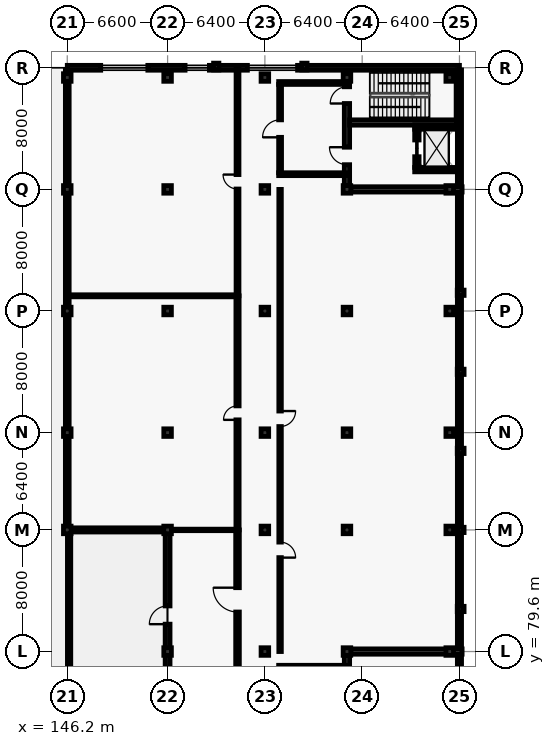
"""IFC4 building model, lengths in metres.
Left out: names, types, materials, properties, quantities, classifications, styles, units other than length and angle.
Written with IfcOpenShell. Run it as: python <this file> out.ifc"""

import sys

from ifc_helpers import new_model, si_unit, direction, frame, frame_2d, origin, origin_2d, place, context, subcontext, project, spatial, rectangle, extrude, element, fill, save


model = new_model("IFC4")
c1 = context("Model", 3, precision=1e-05, world=origin(), true_north=direction((0.0, 1.0)))
c2 = subcontext(c1, "Body", "Model", "MODEL_VIEW")
j1 = project(units=[si_unit("LENGTHUNIT", "METRE"), si_unit("PLANEANGLEUNIT", "RADIAN")], contexts=[c1])
p1 = place(None, origin())
s1 = spatial("IfcSite", under=j1, at=p1, CompositionType="ELEMENT")
p2 = place(p1, origin())
s2 = spatial("IfcBuilding", under=s1, at=p2, CompositionType="ELEMENT")
p3 = place(p2, frame((0.0, 0.0, 20.4)))
s3 = spatial("IfcBuildingStorey", under=s2, at=p3, CompositionType="ELEMENT", Elevation=20.4)
for number, where, z_axis, x_axis in (
    (1, (146.2, 87.6, 0.0), (0.0, 0.0, 1.0), (1.0, 0.0, 0.0)),
    (2, (146.2, 94.0, 0.0), (0.0, 0.0, 1.0), (1.0, 0.0, 0.0)),
    (3, (146.2, 102.0, 0.0), (0.0, 0.0, 1.0), (1.0, 0.0, 0.0)),
    (4, (146.2, 110.0, 0.0), (0.0, 0.0, 1.0), (1.0, 0.0, 0.0)),
    (5, (146.2, 117.36, 0.0), (0.0, 0.0, 1.0), (1.0, 0.0, 0.0)),
    (6, (152.8, 79.6, 0.0), (0.0, 0.0, 1.0), (1.0, 0.0, 0.0)),
    (7, (152.8, 87.6, 0.0), (0.0, 0.0, 1.0), (1.0, 0.0, 0.0)),
    (8, (152.8, 94.0, 0.0), (0.0, 0.0, 1.0), (1.0, 0.0, 0.0)),
    (9, (152.8, 102.0, 0.0), (0.0, 0.0, 1.0), (1.0, 0.0, 0.0)),
    (10, (152.8, 110.0, 0.0), (0.0, 0.0, 1.0), (1.0, 0.0, 0.0)),
    (11, (152.8, 117.36, 0.0), (0.0, 0.0, 1.0), (1.0, 0.0, 0.0)),
    (12, (159.2, 79.6, 0.0), (0.0, 0.0, 1.0), (1.0, 0.0, 0.0)),
    (13, (159.2, 87.6, 0.0), (0.0, 0.0, 1.0), (1.0, 0.0, 0.0)),
    (14, (159.2, 94.0, 0.0), (0.0, 0.0, 1.0), (1.0, 0.0, 0.0)),
    (15, (159.2, 102.0, 0.0), (0.0, 0.0, 1.0), (1.0, 0.0, 0.0)),
    (16, (159.2, 110.0, 0.0), (0.0, 0.0, 1.0), (1.0, 0.0, 0.0)),
    (17, (159.2, 117.36, 0.0), (0.0, 0.0, 1.0), (1.0, 0.0, 0.0)),
    (18, (164.6, 79.6, 0.0), (0.0, 0.0, 1.0), (1.0, 0.0, 0.0)),
    (19, (164.6, 87.6, 0.0), (0.0, 0.0, 1.0), (1.0, 0.0, 0.0)),
    (20, (164.6, 94.0, 0.0), (0.0, 0.0, 1.0), (1.0, 0.0, 0.0)),
    (21, (164.6, 102.0, 0.0), (0.0, 0.0, 1.0), (1.0, 0.0, 0.0)),
    (22, (164.6, 110.0, 0.0), (0.0, 0.0, 1.0), (1.0, 0.0, 0.0)),
    (23, (164.6, 117.36, 0.0), (0.0, 0.0, 1.0), (1.0, 0.0, 0.0)),
    (24, (171.36, 79.6, 0.0), (0.0, 0.0, 1.0), (1.0, 0.0, 0.0)),
    (25, (171.36, 87.6, 0.0), (0.0, 0.0, 1.0), (1.0, 0.0, 0.0)),
    (26, (171.36, 94.0, 0.0), (0.0, 0.0, 1.0), (1.0, 0.0, 0.0)),
    (27, (171.36, 102.0, 0.0), (0.0, 0.0, 1.0), (1.0, 0.0, 0.0)),
    (28, (171.36, 110.0, 0.0), (0.0, 0.0, 1.0), (1.0, 0.0, 0.0)),
    (29, (171.36, 117.36, 0.0), (0.0, 0.0, 1.0), (1.0, 0.0, 0.0)),
):
    element("IfcColumn", number, at=place(p3, frame(where, z_axis=z_axis, x_axis=x_axis)), inside=s3, PredefinedType="COLUMN", context=c2, shape_type="SweptSolid", body=[
        extrude(rectangle(XDim=0.5, YDim=0.5, at=origin_2d()), origin(), (0.0, 0.0, 1.0), 4.5),
    ])
for number, where, z_axis, x_axis in (
    (30, (172.08, 82.4, 0.0), (0.0, 0.0, 1.0), (1.0, 0.0, 0.0)),
    (31, (172.08, 87.6, 0.0), (0.0, 0.0, 1.0), (1.0, 0.0, 0.0)),
    (32, (172.08, 92.8, 0.0), (0.0, 0.0, 1.0), (1.0, 0.0, 0.0)),
    (33, (172.08, 98.0, 0.0), (0.0, 0.0, 1.0), (1.0, 0.0, 0.0)),
    (34, (172.08, 103.2, 0.0), (0.0, 0.0, 1.0), (1.0, 0.0, 0.0)),
    (35, (156.0, 118.08, 0.0), (0.0, 0.0, 1.0), (0.0, 1.0, 0.0)),
    (36, (161.8, 118.08, 0.0), (0.0, 0.0, 1.0), (0.0, 1.0, 0.0)),
):
    element("IfcColumn", number, at=place(p3, frame(where, z_axis=z_axis, x_axis=x_axis)), inside=s3, PredefinedType="PILASTER", context=c2, shape_type="SweptSolid", body=[
        extrude(rectangle(XDim=0.35, YDim=0.45, at=origin_2d()), origin(), (0.0, 0.0, 1.0), 4.5),
    ])
p4 = place(p3, frame((152.8, 87.6, 0.0), z_axis=(0.0, 0.0, 1.0), x_axis=(-1.0, 0.0, 0.0)))
e37 = element("IfcWall", 37, at=p4, inside=s3, PredefinedType="SOLIDWALL", context=c2, shape_type="SweptSolid", body=[
    extrude(rectangle(XDim=6.6, YDim=0.275, at=frame_2d((3.3, 0.0))), origin(), (0.0, 0.0, 1.0), 3.65),
])
p5 = place(p3, frame((146.2, 87.74, 0.0), z_axis=(0.0, 0.0, 1.0), x_axis=(0.0, 1.0, 0.0)))
e38 = element("IfcWall", 38, at=p5, inside=s3, PredefinedType="SOLIDWALL", context=c2, shape_type="SweptSolid", body=[
    extrude(rectangle(XDim=30.12, YDim=0.25, at=frame_2d((15.06, 0.0))), origin(), (0.0, 0.0, 1.0), 3.45),
])
p6 = place(p3, frame((146.2, 118.0, 0.0), z_axis=(0.0, 0.0, 1.0), x_axis=(1.0, 0.0, 0.0)))
e39 = element("IfcWall", 39, at=p6, inside=s3, PredefinedType="SOLIDWALL", context=c2, shape_type="SweptSolid", body=[
    extrude(rectangle(XDim=25.8, YDim=0.32, at=frame_2d((12.9, 0.0))), origin(), (0.0, 0.0, 1.0), 4.3),
])
p7 = place(p6, frame((2.2, 0.0, 0.9)))
e40 = element("IfcOpeningElement", 40, at=p7, cuts=e39, PredefinedType="OPENING", context=c2, shape_type="SweptSolid", body=[
    extrude(rectangle(XDim=3.1, YDim=2.45, at=frame_2d((1.55, 1.225))), frame((0.0, 0.17, 0.0), z_axis=(0.0, -1.0, 0.0), x_axis=(1.0, 0.0, 0.0)), (0.0, 0.0, 1.0), 0.34),
])
p8 = place(p6, frame((7.75, 0.0, 0.9)))
e41 = element("IfcOpeningElement", 41, at=p8, cuts=e39, PredefinedType="OPENING", context=c2, shape_type="SweptSolid", body=[
    extrude(rectangle(XDim=1.6, YDim=1.65, at=frame_2d((0.8, 0.825))), frame((0.0, 0.17, 0.0), z_axis=(0.0, -1.0, 0.0), x_axis=(1.0, 0.0, 0.0)), (0.0, 0.0, 1.0), 0.34),
])
p9 = place(p6, frame((11.85, 0.0, 0.9)))
e42 = element("IfcOpeningElement", 42, at=p9, cuts=e39, PredefinedType="OPENING", context=c2, shape_type="SweptSolid", body=[
    extrude(rectangle(XDim=3.3, YDim=2.5, at=frame_2d((1.65, 1.25))), frame((0.0, 0.17, 0.0), z_axis=(0.0, -1.0, 0.0), x_axis=(1.0, 0.0, 0.0)), (0.0, 0.0, 1.0), 0.34),
])
p10 = place(p3, frame((172.0, 117.86, 0.0), z_axis=(0.0, 0.0, 1.0), x_axis=(0.0, -1.0, 0.0)))
e43 = element("IfcWall", 43, at=p10, inside=s3, PredefinedType="SOLIDWALL", context=c2, shape_type="SweptSolid", body=[
    extrude(rectangle(XDim=46.12, YDim=0.275, at=frame_2d((23.06, 0.0))), origin(), (0.0, 0.0, 1.0), 4.3),
])
p11 = place(p3, frame((152.8, 71.74, 0.0), z_axis=(0.0, 0.0, 1.0), x_axis=(0.0, 1.0, 0.0)))
e44 = element("IfcWall", 44, at=p11, inside=s3, PredefinedType="SOLIDWALL", context=c2, shape_type="SweptSolid", body=[
    extrude(rectangle(XDim=15.72, YDim=0.32, at=frame_2d((7.86, 0.0))), origin(), (0.0, 0.0, 1.0), 3.45),
])
p12 = place(p11, frame((9.66, 0.0, 0.0)))
e45 = element("IfcOpeningElement", 45, at=p12, cuts=e44, PredefinedType="OPENING", context=c2, shape_type="SweptSolid", body=[
    extrude(rectangle(XDim=1.2, YDim=2.2, at=frame_2d((0.6, 1.1))), frame((0.0, 0.17, 0.0), z_axis=(0.0, -1.0, 0.0), x_axis=(1.0, 0.0, 0.0)), (0.0, 0.0, 1.0), 0.34),
])
p13 = place(p3, frame((164.852, 79.6, 0.0), z_axis=(0.0, 0.0, 1.0), x_axis=(1.0, 0.0, 0.0)))
e46 = element("IfcWall", 46, at=p13, inside=s3, PredefinedType="SHEAR", context=c2, shape_type="SweptSolid", body=[
    extrude(rectangle(XDim=7.323, YDim=0.35, at=frame_2d((3.662, 0.0))), origin(), (0.0, 0.0, 1.0), 4.3),
])
p14 = place(p3, frame((164.6, 71.775, 0.0), z_axis=(0.0, 0.0, 1.0), x_axis=(0.0, 1.0, 0.0)))
e47 = element("IfcWall", 47, at=p14, inside=s3, PredefinedType="SHEAR", context=c2, shape_type="SweptSolid", body=[
    extrude(rectangle(XDim=7.573, YDim=0.35, at=frame_2d((3.787, 0.0))), origin(), (0.0, 0.0, 1.0), 4.3),
])
p15 = place(p14, frame((1.075, 0.0, 0.0)))
e48 = element("IfcOpeningElement", 48, at=p15, cuts=e47, PredefinedType="OPENING", context=c2, shape_type="SweptSolid", body=[
    extrude(rectangle(XDim=1.1, YDim=2.15, at=frame_2d((0.55, 1.075))), frame((0.0, 0.185, 0.0), z_axis=(0.0, -1.0, 0.0), x_axis=(1.0, 0.0, 0.0)), (0.0, 0.0, 1.0), 0.37),
])
p16 = place(p14, frame((5.05, 0.0, 0.0)))
e49 = element("IfcOpeningElement", 49, at=p16, cuts=e47, PredefinedType="OPENING", context=c2, shape_type="SweptSolid", body=[
    extrude(rectangle(XDim=1.15, YDim=2.2, at=frame_2d((0.575, 1.1))), frame((0.0, 0.185, 0.0), z_axis=(0.0, -1.0, 0.0), x_axis=(1.0, 0.0, 0.0)), (0.0, 0.0, 1.0), 0.37),
])
p17 = place(p3, frame((160.105, 78.6, 0.0), z_axis=(0.0, 0.0, 1.0), x_axis=(1.0, 0.0, 0.0)))
e50 = element("IfcWall", 50, at=p17, inside=s3, PredefinedType="PARTITIONING", context=c2, shape_type="SweptSolid", body=[
    extrude(rectangle(XDim=4.495, YDim=0.19, at=frame_2d((2.248, 0.0))), origin(), (0.0, 0.0, 1.0), 4.3),
])
p18 = place(p3, frame((164.852, 110.0, 0.0), z_axis=(0.0, 0.0, 1.0), x_axis=(1.0, 0.0, 0.0)))
e51 = element("IfcWall", 51, at=p18, inside=s3, PredefinedType="SHEAR", context=c2, shape_type="SweptSolid", body=[
    extrude(rectangle(XDim=7.323, YDim=0.35, at=frame_2d((3.662, 0.0))), origin(), (0.0, 0.0, 1.0), 4.3),
])
p19 = place(p3, frame((164.6, 110.252, 0.0), z_axis=(0.0, 0.0, 1.0), x_axis=(0.0, 1.0, 0.0)))
e52 = element("IfcWall", 52, at=p19, inside=s3, PredefinedType="SHEAR", context=c2, shape_type="SweptSolid", body=[
    extrude(rectangle(XDim=7.573, YDim=0.35, at=frame_2d((3.787, 0.0))), origin(), (0.0, 0.0, 1.0), 4.3),
])
p20 = place(p19, frame((5.398, 0.0, 0.0)))
e53 = element("IfcOpeningElement", 53, at=p20, cuts=e52, PredefinedType="OPENING", context=c2, shape_type="SweptSolid", body=[
    extrude(rectangle(XDim=1.1, YDim=2.15, at=frame_2d((0.55, 1.075))), frame((0.0, 0.185, 0.0), z_axis=(0.0, -1.0, 0.0), x_axis=(1.0, 0.0, 0.0)), (0.0, 0.0, 1.0), 0.37),
])
p21 = place(p19, frame((1.373, 0.0, 0.0)))
e54 = element("IfcOpeningElement", 54, at=p21, cuts=e52, PredefinedType="OPENING", context=c2, shape_type="SweptSolid", body=[
    extrude(rectangle(XDim=1.15, YDim=2.2, at=frame_2d((0.575, 1.1))), frame((0.0, 0.185, 0.0), z_axis=(0.0, -1.0, 0.0), x_axis=(1.0, 0.0, 0.0)), (0.0, 0.0, 1.0), 0.37),
])
p22 = place(p3, frame((164.775, 114.4, 0.0), z_axis=(0.0, 0.0, 1.0), x_axis=(1.0, 0.0, 0.0)))
e55 = element("IfcWall", 55, at=p22, inside=s3, PredefinedType="SHEAR", context=c2, shape_type="SweptSolid", body=[
    extrude(rectangle(XDim=7.05, YDim=0.35, at=frame_2d((3.525, 0.0))), origin(), (0.0, 0.0, 1.0), 4.3),
])
for number, where, z_axis, x_axis in (
    (56, (169.055, 111.3, 0.0), (0.0, 0.0, 1.0), (1.0, 0.0, 0.0)),
    (57, (169.055, 114.1, 0.0), (0.0, 0.0, 1.0), (1.0, 0.0, 0.0)),
):
    element("IfcWall", number, at=place(p3, frame(where, z_axis=z_axis, x_axis=x_axis)), inside=s3, PredefinedType="SHEAR", context=c2, shape_type="SweptSolid", body=[
        extrude(rectangle(XDim=2.89, YDim=0.29, at=frame_2d((1.445, 0.0))), origin(), (0.0, 0.0, 1.0), 4.3),
    ])
p23 = place(p3, frame((169.2, 111.445, 0.0), z_axis=(0.0, 0.0, 1.0), x_axis=(0.0, 1.0, 0.0)))
e58 = element("IfcWall", 58, at=p23, inside=s3, PredefinedType="SHEAR", context=c2, shape_type="SweptSolid", body=[
    extrude(rectangle(XDim=2.51, YDim=0.29, at=frame_2d((1.255, 0.0))), origin(), (0.0, 0.0, 1.0), 4.3),
])
p24 = place(p23, frame((0.705, 0.0, 0.0)))
e59 = element("IfcOpeningElement", 59, at=p24, cuts=e58, PredefinedType="OPENING", context=c2, shape_type="SweptSolid", body=[
    extrude(rectangle(XDim=1.1, YDim=2.15, at=frame_2d((0.55, 1.075))), frame((0.0, 0.155, 0.0), z_axis=(0.0, -1.0, 0.0), x_axis=(1.0, 0.0, 0.0)), (0.0, 0.0, 1.0), 0.31),
])
p25 = place(p3, frame((160.105, 111.0, 0.0), z_axis=(0.0, 0.0, 1.0), x_axis=(1.0, 0.0, 0.0)))
e60 = element("IfcWall", 60, at=p25, inside=s3, PredefinedType="PARTITIONING", context=c2, shape_type="SweptSolid", body=[
    extrude(rectangle(XDim=4.495, YDim=0.19, at=frame_2d((2.248, 0.0))), origin(), (0.0, 0.0, 1.0), 4.3),
])
p26 = place(p3, frame((160.105, 117.0, 0.0), z_axis=(0.0, 0.0, 1.0), x_axis=(1.0, 0.0, 0.0)))
e61 = element("IfcWall", 61, at=p26, inside=s3, PredefinedType="PARTITIONING", context=c2, shape_type="SweptSolid", body=[
    extrude(rectangle(XDim=4.495, YDim=0.19, at=frame_2d((2.248, 0.0))), origin(), (0.0, 0.0, 1.0), 3.65),
])
p27 = place(p3, frame((160.2, 111.095, 0.0), z_axis=(0.0, 0.0, 1.0), x_axis=(0.0, 1.0, 0.0)))
e62 = element("IfcWall", 62, at=p27, inside=s3, PredefinedType="PARTITIONING", context=c2, shape_type="SweptSolid", body=[
    extrude(rectangle(XDim=5.81, YDim=0.19, at=frame_2d((2.905, 0.0))), origin(), (0.0, 0.0, 1.0), 4.3),
])
p28 = place(p27, frame((2.33, 0.0, 0.0)))
e63 = element("IfcOpeningElement", 63, at=p28, cuts=e62, PredefinedType="OPENING", context=c2, shape_type="SweptSolid", body=[
    extrude(rectangle(XDim=1.15, YDim=2.2, at=frame_2d((0.575, 1.1))), frame((0.0, 0.105, 0.0), z_axis=(0.0, -1.0, 0.0), x_axis=(1.0, 0.0, 0.0)), (0.0, 0.0, 1.0), 0.21),
])
p29 = place(p3, frame((157.4, 78.4, 0.0), z_axis=(0.0, 0.0, 1.0), x_axis=(0.0, 1.0, 0.0)))
e64 = element("IfcWall", 64, at=p29, inside=s3, PredefinedType="PARTITIONING", context=c2, shape_type="SweptSolid", body=[
    extrude(rectangle(XDim=9.2, YDim=0.24, at=frame_2d((4.6, 0.0))), origin(), (0.0, 0.0, 1.0), 4.3),
])
p30 = place(p29, frame((3.8, 0.0, 0.0)))
e65 = element("IfcOpeningElement", 65, at=p30, cuts=e64, PredefinedType="OPENING", context=c2, shape_type="SweptSolid", body=[
    extrude(rectangle(XDim=1.6, YDim=2.3, at=frame_2d((0.8, 1.15))), frame((0.0, 0.13, 0.0), z_axis=(0.0, -1.0, 0.0), x_axis=(1.0, 0.0, 0.0)), (0.0, 0.0, 1.0), 0.26),
])
p31 = place(p3, frame((157.4, 87.6, 0.0), z_axis=(0.0, 0.0, 1.0), x_axis=(0.0, 1.0, 0.0)))
e66 = element("IfcWall", 66, at=p31, inside=s3, PredefinedType="PARTITIONING", context=c2, shape_type="SweptSolid", body=[
    extrude(rectangle(XDim=15.4, YDim=0.21, at=frame_2d((7.7, 0.0))), origin(), (0.0, 0.0, 1.0), 4.3),
])
p32 = place(p31, frame((7.24, 0.0, 0.0)))
e67 = element("IfcOpeningElement", 67, at=p32, cuts=e66, PredefinedType="OPENING", context=c2, shape_type="SweptSolid", body=[
    extrude(rectangle(XDim=0.92, YDim=2.1, at=frame_2d((0.46, 1.05))), frame((0.0, 0.115, 0.0), z_axis=(0.0, -1.0, 0.0), x_axis=(1.0, 0.0, 0.0)), (0.0, 0.0, 1.0), 0.23),
])
p33 = place(p3, frame((157.4, 103.0, 0.0), z_axis=(0.0, 0.0, 1.0), x_axis=(0.0, 1.0, 0.0)))
e68 = element("IfcWall", 68, at=p33, inside=s3, PredefinedType="PARTITIONING", context=c2, shape_type="SweptSolid", body=[
    extrude(rectangle(XDim=15.0, YDim=0.19, at=frame_2d((7.5, 0.0))), origin(), (0.0, 0.0, 1.0), 4.3),
])
p34 = place(p33, frame((7.025, 0.0, 0.0)))
e69 = element("IfcOpeningElement", 69, at=p34, cuts=e68, PredefinedType="OPENING", context=c2, shape_type="SweptSolid", body=[
    extrude(rectangle(XDim=0.95, YDim=2.1, at=frame_2d((0.475, 1.05))), frame((0.0, 0.105, 0.0), z_axis=(0.0, -1.0, 0.0), x_axis=(1.0, 0.0, 0.0)), (0.0, 0.0, 1.0), 0.21),
])
p35 = place(p3, frame((160.2, 110.0, 0.0), z_axis=(0.0, 0.0, 1.0), x_axis=(0.0, -1.0, 0.0)))
e70 = element("IfcWall", 70, at=p35, inside=s3, PredefinedType="PARTITIONING", context=c2, shape_type="SweptSolid", body=[
    extrude(rectangle(XDim=30.4, YDim=0.165, at=frame_2d((15.2, 0.0))), origin(), (0.0, 0.0, 1.0), 4.3),
])
p36 = place(p35, frame((14.58, 0.0, 0.0)))
e71 = element("IfcOpeningElement", 71, at=p36, cuts=e70, PredefinedType="OPENING", context=c2, shape_type="SweptSolid", body=[
    extrude(rectangle(XDim=1.02, YDim=2.1, at=frame_2d((0.51, 1.05))), frame((0.0, 0.093, 0.0), z_axis=(0.0, -1.0, 0.0), x_axis=(1.0, 0.0, 0.0)), (0.0, 0.0, 1.0), 0.185),
])
p37 = place(p35, frame((23.202, 0.0, 0.0)))
e72 = element("IfcOpeningElement", 72, at=p37, cuts=e70, PredefinedType="OPENING", context=c2, shape_type="SweptSolid", body=[
    extrude(rectangle(XDim=1.02, YDim=2.1, at=frame_2d((0.51, 1.05))), frame((0.0, 0.093, 0.0), z_axis=(0.0, -1.0, 0.0), x_axis=(1.0, 0.0, 0.0)), (0.0, 0.0, 1.0), 0.185),
])
p38 = place(p3, frame((153.052, 87.6, 0.0), z_axis=(0.0, 0.0, 1.0), x_axis=(1.0, 0.0, 0.0)))
e73 = element("IfcWall", 73, at=p38, inside=s3, PredefinedType="PARTITIONING", context=c2, shape_type="SweptSolid", body=[
    extrude(rectangle(XDim=4.348, YDim=0.1, at=frame_2d((2.174, 0.0))), origin(), (0.0, 0.0, 1.0), 3.65),
])
p39 = place(p3, frame((146.2, 103.0, 0.0), z_axis=(0.0, 0.0, 1.0), x_axis=(1.0, 0.0, 0.0)))
e74 = element("IfcWall", 74, at=p39, inside=s3, PredefinedType="PARTITIONING", context=c2, shape_type="SweptSolid", body=[
    extrude(rectangle(XDim=11.2, YDim=0.135, at=frame_2d((5.6, 0.0))), origin(), (0.0, 0.0, 1.0), 4.3),
])
p40 = place(p3, frame((146.32, 71.62, 0.0), z_axis=(0.0, 0.0, 1.0), x_axis=(0.0, 1.0, 0.0)))
e75 = element("IfcWall", 75, at=p40, inside=s3, PredefinedType="PARAPET", context=c2, shape_type="SweptSolid", body=[
    extrude(rectangle(XDim=15.93, YDim=0.22, at=frame_2d((7.965, 0.0))), origin(), (0.0, 0.0, 1.0), 0.95),
])
p41 = place(p12, origin())
e76 = element("IfcDoor", 76, at=p41, inside=s3, OperationType="SINGLE_SWING_LEFT", PredefinedType="DOOR", context=c2, shape_type="SweptSolid", body=[
    extrude(rectangle(XDim=1.2, YDim=2.2, at=frame_2d((0.6, 1.1))), frame((0.0, 0.025, 0.0), z_axis=(0.0, -1.0, 0.0), x_axis=(1.0, 0.0, 0.0)), (0.0, 0.0, 1.0), 0.05),
])
fill(e45, e76)
p42 = place(p7, origin())
e77 = element("IfcWindow", 77, at=p42, inside=s3, PartitioningType="SINGLE_PANEL", PredefinedType="WINDOW", context=c2, shape_type="SweptSolid", body=[
    extrude(rectangle(XDim=3.1, YDim=2.45, at=frame_2d((1.55, 1.225))), frame((0.0, 0.03, 0.0), z_axis=(0.0, -1.0, 0.0), x_axis=(1.0, 0.0, 0.0)), (0.0, 0.0, 1.0), 0.06),
])
fill(e40, e77)
p43 = place(p8, origin())
e78 = element("IfcWindow", 78, at=p43, inside=s3, PartitioningType="SINGLE_PANEL", PredefinedType="WINDOW", context=c2, shape_type="SweptSolid", body=[
    extrude(rectangle(XDim=1.6, YDim=1.65, at=frame_2d((0.8, 0.825))), frame((0.0, 0.03, 0.0), z_axis=(0.0, -1.0, 0.0), x_axis=(1.0, 0.0, 0.0)), (0.0, 0.0, 1.0), 0.06),
])
fill(e41, e78)
p44 = place(p9, origin())
e79 = element("IfcWindow", 79, at=p44, inside=s3, PartitioningType="SINGLE_PANEL", PredefinedType="WINDOW", context=c2, shape_type="SweptSolid", body=[
    extrude(rectangle(XDim=3.3, YDim=2.5, at=frame_2d((1.65, 1.25))), frame((0.0, 0.03, 0.0), z_axis=(0.0, -1.0, 0.0), x_axis=(1.0, 0.0, 0.0)), (0.0, 0.0, 1.0), 0.06),
])
fill(e42, e79)
p45 = place(p20, origin())
e80 = element("IfcDoor", 80, at=p45, inside=s3, OperationType="SINGLE_SWING_LEFT", PredefinedType="DOOR", context=c2, shape_type="SweptSolid", body=[
    extrude(rectangle(XDim=1.1, YDim=2.15, at=frame_2d((0.55, 1.075))), frame((0.0, 0.025, 0.0), z_axis=(0.0, -1.0, 0.0), x_axis=(1.0, 0.0, 0.0)), (0.0, 0.0, 1.0), 0.05),
])
fill(e53, e80)
p46 = place(p21, origin())
e81 = element("IfcDoor", 81, at=p46, inside=s3, OperationType="SINGLE_SWING_RIGHT", PredefinedType="DOOR", context=c2, shape_type="SweptSolid", body=[
    extrude(rectangle(XDim=1.15, YDim=2.2, at=frame_2d((0.575, 1.1))), frame((0.0, 0.025, 0.0), z_axis=(0.0, -1.0, 0.0), x_axis=(1.0, 0.0, 0.0)), (0.0, 0.0, 1.0), 0.05),
])
fill(e54, e81)
p47 = place(p24, origin())
e82 = element("IfcDoor", 82, at=p47, inside=s3, OperationType="SLIDING_TO_LEFT", PredefinedType="DOOR", context=c2, shape_type="SweptSolid", body=[
    extrude(rectangle(XDim=1.1, YDim=2.15, at=frame_2d((0.55, 1.075))), frame((0.0, 0.025, 0.0), z_axis=(0.0, -1.0, 0.0), x_axis=(1.0, 0.0, 0.0)), (0.0, 0.0, 1.0), 0.05),
])
fill(e59, e82)
p48 = place(p28, origin())
e83 = element("IfcDoor", 83, at=p48, inside=s3, OperationType="SINGLE_SWING_LEFT", PredefinedType="DOOR", context=c2, shape_type="SweptSolid", body=[
    extrude(rectangle(XDim=1.15, YDim=2.2, at=frame_2d((0.575, 1.1))), frame((0.0, 0.025, 0.0), z_axis=(0.0, -1.0, 0.0), x_axis=(1.0, 0.0, 0.0)), (0.0, 0.0, 1.0), 0.05),
])
fill(e63, e83)
p49 = place(p30, origin())
e84 = element("IfcDoor", 84, at=p49, inside=s3, OperationType="SINGLE_SWING_RIGHT", PredefinedType="DOOR", context=c2, shape_type="SweptSolid", body=[
    extrude(rectangle(XDim=1.6, YDim=2.3, at=frame_2d((0.8, 1.15))), frame((0.0, 0.025, 0.0), z_axis=(0.0, -1.0, 0.0), x_axis=(1.0, 0.0, 0.0)), (0.0, 0.0, 1.0), 0.05),
])
fill(e65, e84)
p50 = place(p32, origin())
e85 = element("IfcDoor", 85, at=p50, inside=s3, OperationType="SINGLE_SWING_LEFT", PredefinedType="DOOR", context=c2, shape_type="SweptSolid", body=[
    extrude(rectangle(XDim=0.92, YDim=2.1, at=frame_2d((0.46, 1.05))), frame((0.0, 0.025, 0.0), z_axis=(0.0, -1.0, 0.0), x_axis=(1.0, 0.0, 0.0)), (0.0, 0.0, 1.0), 0.05),
])
fill(e67, e85)
p51 = place(p34, origin())
e86 = element("IfcDoor", 86, at=p51, inside=s3, OperationType="SINGLE_SWING_RIGHT", PredefinedType="DOOR", context=c2, shape_type="SweptSolid", body=[
    extrude(rectangle(XDim=0.95, YDim=2.1, at=frame_2d((0.475, 1.05))), frame((0.0, 0.025, 0.0), z_axis=(0.0, -1.0, 0.0), x_axis=(1.0, 0.0, 0.0)), (0.0, 0.0, 1.0), 0.05),
])
fill(e69, e86)
p52 = place(p36, origin())
e87 = element("IfcDoor", 87, at=p52, inside=s3, OperationType="SINGLE_SWING_LEFT", PredefinedType="DOOR", context=c2, shape_type="SweptSolid", body=[
    extrude(rectangle(XDim=1.02, YDim=2.1, at=frame_2d((0.51, 1.05))), frame((0.0, 0.025, 0.0), z_axis=(0.0, -1.0, 0.0), x_axis=(1.0, 0.0, 0.0)), (0.0, 0.0, 1.0), 0.05),
])
fill(e71, e87)
p53 = place(p37, origin())
e88 = element("IfcDoor", 88, at=p53, inside=s3, OperationType="SINGLE_SWING_RIGHT", PredefinedType="DOOR", context=c2, shape_type="SweptSolid", body=[
    extrude(rectangle(XDim=1.02, YDim=2.1, at=frame_2d((0.51, 1.05))), frame((0.0, 0.025, 0.0), z_axis=(0.0, -1.0, 0.0), x_axis=(1.0, 0.0, 0.0)), (0.0, 0.0, 1.0), 0.05),
])
fill(e72, e88)
save(model, sys.argv[1])
